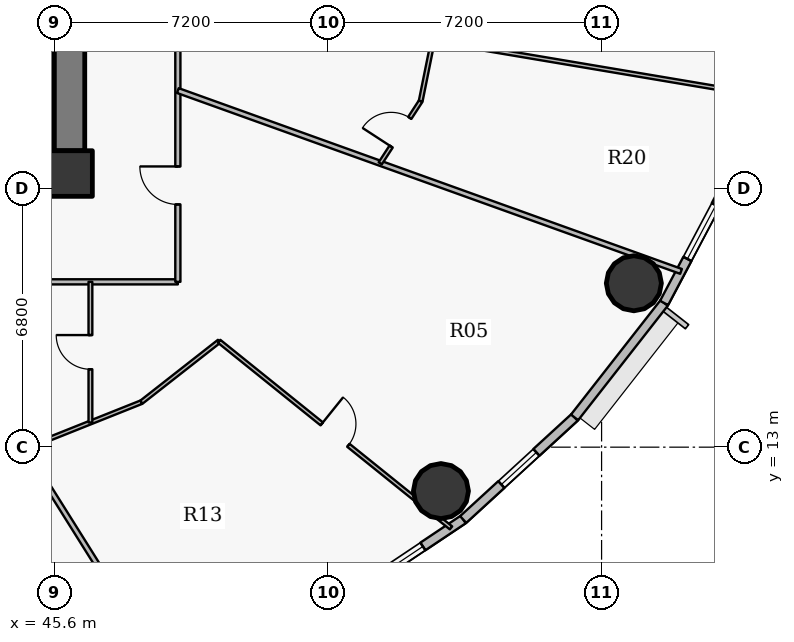
"""IFC4 building model, lengths in metres.
Left out: names, types, materials, properties, quantities, classifications, styles, units other than length and angle.
Written with IfcOpenShell. Run it as: python <this file> out.ifc"""

import sys

from ifc_helpers import new_model, si_unit, direction, frame, frame_2d, origin, origin_2d, place, context, subcontext, project, spatial, rectangle, hollow_circle, extrude, source, transform, mapped, element, fill, save


model = new_model("IFC4")
c1 = context("Model", 3, precision=1e-05, world=origin(), true_north=direction((0.0, 1.0)))
c2 = subcontext(c1, "Body", "Model", "MODEL_VIEW")
j1 = project(units=[si_unit("LENGTHUNIT", "METRE"), si_unit("PLANEANGLEUNIT", "RADIAN")], contexts=[c1])
p1 = place(None, origin())
s1 = spatial("IfcSite", under=j1, at=p1, CompositionType="ELEMENT")
p2 = place(p1, origin())
s2 = spatial("IfcBuilding", under=s1, at=p2, CompositionType="ELEMENT")
p3 = place(p2, frame((0.0, 0.0, 119.7)))
s3 = spatial("IfcBuildingStorey", under=s2, at=p3, CompositionType="ELEMENT", Elevation=119.7)
p4 = place(p3, frame((46.0, 20.2, 0.0), z_axis=(0.0, 0.0, 1.0), x_axis=(1.0, 0.0, 0.0)))
e1 = element("IfcColumn", 1, at=p4, inside=s3, PredefinedType="COLUMN", context=c2, shape_type="SweptSolid", body=[
    extrude(rectangle(XDim=1.2, YDim=1.2, at=origin_2d()), origin(), (0.0, 0.0, 1.0), 3.75),
])
p5 = place(p3, frame((46.0, 33.2, 0.0), z_axis=(0.0, 0.0, 1.0), x_axis=(0.0, -1.0, 0.0)))
e2 = element("IfcWall", 2, at=p5, inside=s3, PredefinedType="SHEAR", context=c2, shape_type="SweptSolid", body=[
    extrude(rectangle(XDim=12.4, YDim=0.8, at=frame_2d((6.2, 0.0))), origin(), (0.0, 0.0, 1.0), 2.95),
])
p6 = place(p5, frame((5.79, 0.0, 0.0)))
e3 = element("IfcOpeningElement", 3, at=p6, cuts=e2, PredefinedType="OPENING", context=c2, shape_type="SweptSolid", body=[
    extrude(rectangle(XDim=0.82, YDim=2.1, at=origin_2d()), frame((0.41, 0.41, 1.05), z_axis=(0.0, -1.0, 0.0), x_axis=(1.0, 0.0, 0.0)), (0.0, 0.0, 1.0), 0.82),
])
for number, where, z_axis, x_axis in (
    (4, (55.773, 11.844, 0.0), (0.0, 0.0, 1.0), (1.0, 0.0, 0.0)),
    (5, (60.849, 17.312, 0.0), (0.0, 0.0, 1.0), (1.0, 0.0, 0.0)),
):
    element("IfcColumn", number, at=place(p3, frame(where, z_axis=z_axis, x_axis=x_axis)), inside=s3, PredefinedType="COLUMN", context=c2, shape_type="SweptSolid", body=[
        extrude(hollow_circle(Radius=0.725, WallThickness=0.042, at=origin_2d()), origin(), (0.0, 0.0, 1.0), 3.75),
    ])
p7 = place(p3, frame((56.358, 11.097, 0.0), z_axis=(0.0, 0.0, 1.0), x_axis=(-0.831221811447, -0.555940914284, 0.0)))
e6 = element("IfcWall", 6, at=p7, inside=s3, PredefinedType="SOLIDWALL", context=c2, shape_type="SweptSolid", body=[
    extrude(rectangle(XDim=4.13, YDim=0.24, at=frame_2d((2.065, 0.0))), origin(), (0.0, 0.0, 1.0), 3.5),
])
p8 = place(p7, frame((1.276, 0.0, 0.9)))
e7 = element("IfcOpeningElement", 7, at=p8, cuts=e6, PredefinedType="OPENING", context=c2, shape_type="SweptSolid", body=[
    extrude(rectangle(XDim=2.0, YDim=1.75, at=origin_2d()), frame((1.0, 0.13, 0.875), z_axis=(0.0, -1.0, 0.0), x_axis=(1.0, 0.0, 0.0)), (0.0, 0.0, 1.0), 0.26),
])
p9 = place(p3, frame((59.289, 13.783, 0.0), z_axis=(0.0, 0.0, 1.0), x_axis=(-0.737113356241, -0.675769117414, 0.0)))
e8 = element("IfcWall", 8, at=p9, inside=s3, PredefinedType="SOLIDWALL", context=c2, shape_type="SweptSolid", body=[
    extrude(rectangle(XDim=3.976, YDim=0.24, at=frame_2d((1.988, 0.0))), origin(), (0.0, 0.0, 1.0), 3.5),
])
p10 = place(p9, frame((1.363, 0.0, 0.9)))
e9 = element("IfcOpeningElement", 9, at=p10, cuts=e8, PredefinedType="OPENING", context=c2, shape_type="SweptSolid", body=[
    extrude(rectangle(XDim=1.25, YDim=1.65, at=origin_2d()), frame((0.625, 0.13, 0.825), z_axis=(0.0, -1.0, 0.0), x_axis=(1.0, 0.0, 0.0)), (0.0, 0.0, 1.0), 0.26),
])
p11 = place(p3, frame((61.645, 16.794, 0.0), z_axis=(0.0, 0.0, 1.0), x_axis=(-0.616272103517, -0.787533297345, 0.0)))
e10 = element("IfcWall", 10, at=p11, inside=s3, PredefinedType="SOLIDWALL", context=c2, shape_type="SweptSolid", body=[
    extrude(rectangle(XDim=3.823, YDim=0.24, at=frame_2d((1.912, 0.0))), origin(), (0.0, 0.0, 1.0), 3.5),
])
p12 = place(p3, frame((63.37, 20.055, 0.0), z_axis=(0.0, 0.0, 1.0), x_axis=(-0.467614004126, -0.883932770716, 0.0)))
e11 = element("IfcWall", 11, at=p12, inside=s3, PredefinedType="SOLIDWALL", context=c2, shape_type="SweptSolid", body=[
    extrude(rectangle(XDim=3.689, YDim=0.24, at=frame_2d((1.844, 0.0))), origin(), (0.0, 0.0, 1.0), 3.5),
])
p13 = place(p12, frame((0.778, 0.0, 0.9)))
e12 = element("IfcOpeningElement", 12, at=p13, cuts=e11, PredefinedType="OPENING", context=c2, shape_type="SweptSolid", body=[
    extrude(rectangle(XDim=1.6, YDim=1.75, at=origin_2d()), frame((0.8, 0.13, 0.875), z_axis=(0.0, -1.0, 0.0), x_axis=(1.0, 0.0, 0.0)), (0.0, 0.0, 1.0), 0.26),
])
p14 = place(p3, frame((35.584, 17.35, 0.0), z_axis=(0.0, 0.0, 1.0), x_axis=(1.0, 0.0, 0.0)))
e13 = element("IfcWall", 13, at=p14, inside=s3, PredefinedType="PARTITIONING", context=c2, shape_type="SweptSolid", body=[
    extrude(rectangle(XDim=13.266, YDim=0.135, at=frame_2d((6.633, 0.0))), origin(), (0.0, 0.0, 1.0), 2.935),
])
p15 = place(p14, frame((2.757, 0.0, 0.0)))
e14 = element("IfcOpeningElement", 14, at=p15, cuts=e13, PredefinedType="OPENING", context=c2, shape_type="SweptSolid", body=[
    extrude(rectangle(XDim=1.0, YDim=2.15, at=origin_2d()), frame((0.5, 0.078, 1.075), z_axis=(0.0, -1.0, 0.0), x_axis=(1.0, 0.0, 0.0)), (0.0, 0.0, 1.0), 0.155),
])
p16 = place(p3, frame((42.058, 17.35, 0.0), z_axis=(0.0, 0.0, 1.0), x_axis=(0.531660079213, -0.846957826678, 0.0)))
e15 = element("IfcWall", 15, at=p16, inside=s3, PredefinedType="PARTITIONING", context=c2, shape_type="SweptSolid", body=[
    extrude(rectangle(XDim=12.437, YDim=0.135, at=frame_2d((6.219, 0.0))), origin(), (0.0, 0.0, 1.0), 2.935),
])
p17 = place(p3, frame((42.251, 11.934, 0.0), z_axis=(0.0, 0.0, 1.0), x_axis=(0.928803554156, 0.370572473055, 0.0)))
e16 = element("IfcWall", 16, at=p17, inside=s3, PredefinedType="PARTITIONING", context=c2, shape_type="SweptSolid", body=[
    extrude(rectangle(XDim=6.072, YDim=0.1, at=frame_2d((3.036, 0.0))), origin(), (0.0, 0.0, 1.0), 2.935),
])
p18 = place(p3, frame((46.549, 13.649, 0.0), z_axis=(0.0, 0.0, 1.0), x_axis=(0.0, 1.0, 0.0)))
e17 = element("IfcWall", 17, at=p18, inside=s3, PredefinedType="PARTITIONING", context=c2, shape_type="SweptSolid", body=[
    extrude(rectangle(XDim=3.701, YDim=0.1, at=frame_2d((1.851, 0.0))), origin(), (0.0, 0.0, 1.0), 3.5),
])
p19 = place(p18, frame((1.4, 0.0, 0.0)))
e18 = element("IfcOpeningElement", 18, at=p19, cuts=e17, PredefinedType="OPENING", context=c2, shape_type="SweptSolid", body=[
    extrude(rectangle(XDim=0.9, YDim=2.1, at=origin_2d()), frame((0.45, 0.06, 1.05), z_axis=(0.0, -1.0, 0.0), x_axis=(1.0, 0.0, 0.0)), (0.0, 0.0, 1.0), 0.12),
])
p20 = place(p3, frame((47.891, 14.184, 0.0), z_axis=(0.0, 0.0, 1.0), x_axis=(0.787364158956, 0.616488184146, 0.0)))
e19 = element("IfcWall", 19, at=p20, inside=s3, PredefinedType="PARTITIONING", context=c2, shape_type="SweptSolid", body=[
    extrude(rectangle(XDim=2.597, YDim=0.1, at=frame_2d((1.299, 0.0))), origin(), (0.0, 0.0, 1.0), 3.5),
])
p21 = place(p3, frame((48.85, 17.35, 0.0), z_axis=(0.0, 0.0, 1.0), x_axis=(0.0, 1.0, 0.0)))
e20 = element("IfcWall", 20, at=p21, inside=s3, PredefinedType="PARTITIONING", context=c2, shape_type="SweptSolid", body=[
    extrude(rectangle(XDim=19.3, YDim=0.135, at=frame_2d((9.65, 0.0))), origin(), (0.0, 0.0, 1.0), 2.935),
])
p22 = place(p21, frame((2.036, 0.0, 0.0)))
e21 = element("IfcOpeningElement", 21, at=p22, cuts=e20, PredefinedType="OPENING", context=c2, shape_type="SweptSolid", body=[
    extrude(rectangle(XDim=1.0, YDim=2.15, at=origin_2d()), frame((0.5, 0.078, 1.075), z_axis=(0.0, -1.0, 0.0), x_axis=(1.0, 0.0, 0.0)), (0.0, 0.0, 1.0), 0.155),
])
p23 = place(p21, frame((10.875, 0.0, 0.0)))
e22 = element("IfcOpeningElement", 22, at=p23, cuts=e20, PredefinedType="OPENING", context=c2, shape_type="SweptSolid", body=[
    extrude(rectangle(XDim=1.0, YDim=2.15, at=origin_2d()), frame((0.5, 0.078, 1.075), z_axis=(0.0, -1.0, 0.0), x_axis=(1.0, 0.0, 0.0)), (0.0, 0.0, 1.0), 0.155),
])
p24 = place(p3, frame((48.85, 22.383, 0.0), z_axis=(0.0, 0.0, 1.0), x_axis=(0.941089213164, -0.338158384292, 0.0)))
e23 = element("IfcWall", 23, at=p24, inside=s3, PredefinedType="PARTITIONING", context=c2, shape_type="SweptSolid", body=[
    extrude(rectangle(XDim=14.069, YDim=0.135, at=frame_2d((7.035, 0.0))), origin(), (0.0, 0.0, 1.0), 2.935),
])
p25 = place(p3, frame((49.936, 15.786, 0.0), z_axis=(0.0, 0.0, 1.0), x_axis=(0.779083359145, -0.626920345421, 0.0)))
e24 = element("IfcWall", 24, at=p25, inside=s3, PredefinedType="PARTITIONING", context=c2, shape_type="SweptSolid", body=[
    extrude(rectangle(XDim=7.831, YDim=0.1, at=frame_2d((3.916, 0.0))), origin(), (0.0, 0.0, 1.0), 2.935),
])
p26 = place(p25, frame((3.466, 0.0, 0.0)))
e25 = element("IfcOpeningElement", 25, at=p26, cuts=e24, PredefinedType="OPENING", context=c2, shape_type="SweptSolid", body=[
    extrude(rectangle(XDim=0.9, YDim=2.1, at=origin_2d()), frame((0.45, 0.06, 1.05), z_axis=(0.0, -1.0, 0.0), x_axis=(1.0, 0.0, 0.0)), (0.0, 0.0, 1.0), 0.12),
])
p27 = place(p3, frame((54.176, 20.469, 0.0), z_axis=(0.0, 0.0, 1.0), x_axis=(0.545370803514, 0.838194897786, 0.0)))
e26 = element("IfcWall", 26, at=p27, inside=s3, PredefinedType="PARTITIONING", context=c2, shape_type="SweptSolid", body=[
    extrude(rectangle(XDim=1.952, YDim=0.1, at=frame_2d((0.976, 0.0))), origin(), (0.0, 0.0, 1.0), 3.5),
])
p28 = place(p27, frame((0.526, 0.0, 0.0)))
e27 = element("IfcOpeningElement", 27, at=p28, cuts=e26, PredefinedType="OPENING", context=c2, shape_type="SweptSolid", body=[
    extrude(rectangle(XDim=0.9, YDim=2.1, at=origin_2d()), frame((0.45, 0.06, 1.05), z_axis=(0.0, -1.0, 0.0), x_axis=(1.0, 0.0, 0.0)), (0.0, 0.0, 1.0), 0.12),
])
p29 = place(p3, frame((55.24, 22.105, 0.0), z_axis=(0.0, 0.0, 1.0), x_axis=(0.198205355444, 0.980160515973, 0.0)))
e28 = element("IfcWall", 28, at=p29, inside=s3, PredefinedType="PARTITIONING", context=c2, shape_type="SweptSolid", body=[
    extrude(rectangle(XDim=4.112, YDim=0.1, at=frame_2d((2.056, 0.0))), origin(), (0.0, 0.0, 1.0), 3.5),
])
p30 = place(p3, frame((55.564, 23.708, 0.0), z_axis=(0.0, 0.0, 1.0), x_axis=(0.986139151265, -0.165920385556, 0.0)))
e29 = element("IfcWall", 29, at=p30, inside=s3, PredefinedType="PARTITIONING", context=c2, shape_type="SweptSolid", body=[
    extrude(rectangle(XDim=8.612, YDim=0.1, at=frame_2d((4.306, 0.0))), origin(), (0.0, 0.0, 1.0), 2.935),
])
p31 = place(p3, frame((45.41, 19.8, 0.0), z_axis=(0.0, 0.0, 1.0), x_axis=(1.0, 0.0, 0.0)))
e30 = element("IfcWall", 30, at=p31, inside=s3, PredefinedType="PARTITIONING", context=c2, shape_type="SweptSolid", body=[
    extrude(rectangle(XDim=0.99, YDim=0.135, at=frame_2d((0.495, 0.0))), origin(), (0.0, 0.0, 1.0), 2.935),
])
p32 = place(p3, frame((46.4, 20.107, 0.0), z_axis=(0.0, 0.0, 1.0), x_axis=(0.0, 1.0, 0.0)))
e31 = element("IfcWall", 31, at=p32, inside=s3, PredefinedType="PARTITIONING", context=c2, shape_type="SweptSolid", body=[
    extrude(rectangle(XDim=0.683, YDim=0.135, at=frame_2d((0.341, 0.0))), origin(), (0.0, 0.0, 1.0), 3.5),
])
m1 = source(origin(), c2, "Body", "SweptSolid", [
    extrude(rectangle(XDim=2.0, YDim=1.75, at=origin_2d()), frame((1.0, 0.03, 0.875), z_axis=(0.0, -1.0, 0.0), x_axis=(1.0, 0.0, 0.0)), (0.0, 0.0, 1.0), 0.06),
])
p33 = place(p8, origin())
e32 = element("IfcWindow", 32, at=p33, inside=s3, PartitioningType="DOUBLE_PANEL_VERTICAL", PredefinedType="WINDOW", context=c2, shape_type="MappedRepresentation", body=[
    mapped(m1, transform((0.0, 0.0, 0.0), x_axis=(1.0, 0.0, 0.0), y_axis=(0.0, 1.0, 0.0), z_axis=(0.0, 0.0, 1.0), scale=1.0)),
])
fill(e7, e32)
m2 = source(origin(), c2, "Body", "SweptSolid", [
    extrude(rectangle(XDim=1.6, YDim=1.75, at=origin_2d()), frame((0.8, 0.03, 0.875), z_axis=(0.0, -1.0, 0.0), x_axis=(1.0, 0.0, 0.0)), (0.0, 0.0, 1.0), 0.06),
])
p34 = place(p13, origin())
e33 = element("IfcWindow", 33, at=p34, inside=s3, PartitioningType="DOUBLE_PANEL_VERTICAL", PredefinedType="WINDOW", context=c2, shape_type="MappedRepresentation", body=[
    mapped(m2, transform((0.0, 0.0, 0.0), x_axis=(1.0, 0.0, 0.0), y_axis=(0.0, 1.0, 0.0), z_axis=(0.0, 0.0, 1.0), scale=1.0)),
])
fill(e12, e33)
m3 = source(origin(), c2, "Body", "SweptSolid", [
    extrude(rectangle(XDim=1.25, YDim=1.65, at=origin_2d()), frame((0.625, 0.03, 0.825), z_axis=(0.0, -1.0, 0.0), x_axis=(1.0, 0.0, 0.0)), (0.0, 0.0, 1.0), 0.06),
])
p35 = place(p10, origin())
e34 = element("IfcWindow", 34, at=p35, inside=s3, PartitioningType="SINGLE_PANEL", PredefinedType="WINDOW", context=c2, shape_type="MappedRepresentation", body=[
    mapped(m3, transform((0.0, 0.0, 0.0), x_axis=(1.0, 0.0, 0.0), y_axis=(0.0, 1.0, 0.0), z_axis=(0.0, 0.0, 1.0), scale=1.0)),
])
fill(e9, e34)
m4 = source(origin(), c2, "Body", "SweptSolid", [
    extrude(rectangle(XDim=1.0, YDim=2.15, at=origin_2d()), frame((0.5, 0.025, 1.075), z_axis=(0.0, -1.0, 0.0), x_axis=(1.0, 0.0, 0.0)), (0.0, 0.0, 1.0), 0.05),
])
p36 = place(p22, origin())
e35 = element("IfcDoor", 35, at=p36, inside=s3, OperationType="SINGLE_SWING_RIGHT", PredefinedType="DOOR", context=c2, shape_type="MappedRepresentation", body=[
    mapped(m4, transform((0.0, 0.0, 0.0), x_axis=(1.0, 0.0, 0.0), y_axis=(0.0, 1.0, 0.0), z_axis=(0.0, 0.0, 1.0), scale=1.0)),
])
fill(e21, e35)
m5 = source(origin(), c2, "Body", "SweptSolid", [
    extrude(rectangle(XDim=0.9, YDim=2.1, at=origin_2d()), frame((0.45, 0.025, 1.05), z_axis=(0.0, -1.0, 0.0), x_axis=(1.0, 0.0, 0.0)), (0.0, 0.0, 1.0), 0.05),
])
p37 = place(p26, origin())
e36 = element("IfcDoor", 36, at=p37, inside=s3, OperationType="SINGLE_SWING_LEFT", PredefinedType="DOOR", context=c2, shape_type="MappedRepresentation", body=[
    mapped(m5, transform((0.0, 0.0, 0.0), x_axis=(1.0, 0.0, 0.0), y_axis=(0.0, 1.0, 0.0), z_axis=(0.0, 0.0, 1.0), scale=1.0)),
])
fill(e25, e36)
p38 = place(p19, origin())
e37 = element("IfcDoor", 37, at=p38, inside=s3, OperationType="SINGLE_SWING_RIGHT", PredefinedType="DOOR", context=c2, shape_type="MappedRepresentation", body=[
    mapped(m5, transform((0.0, 0.0, 0.0), x_axis=(1.0, 0.0, 0.0), y_axis=(0.0, 1.0, 0.0), z_axis=(0.0, 0.0, 1.0), scale=1.0)),
])
fill(e18, e37)
p39 = place(p28, origin())
e38 = element("IfcDoor", 38, at=p39, inside=s3, OperationType="SINGLE_SWING_LEFT", PredefinedType="DOOR", context=c2, shape_type="MappedRepresentation", body=[
    mapped(m5, transform((0.0, 0.0, 0.0), x_axis=(1.0, 0.0, 0.0), y_axis=(0.0, 1.0, 0.0), z_axis=(0.0, 0.0, 1.0), scale=1.0)),
])
fill(e27, e38)
save(model, sys.argv[1])
